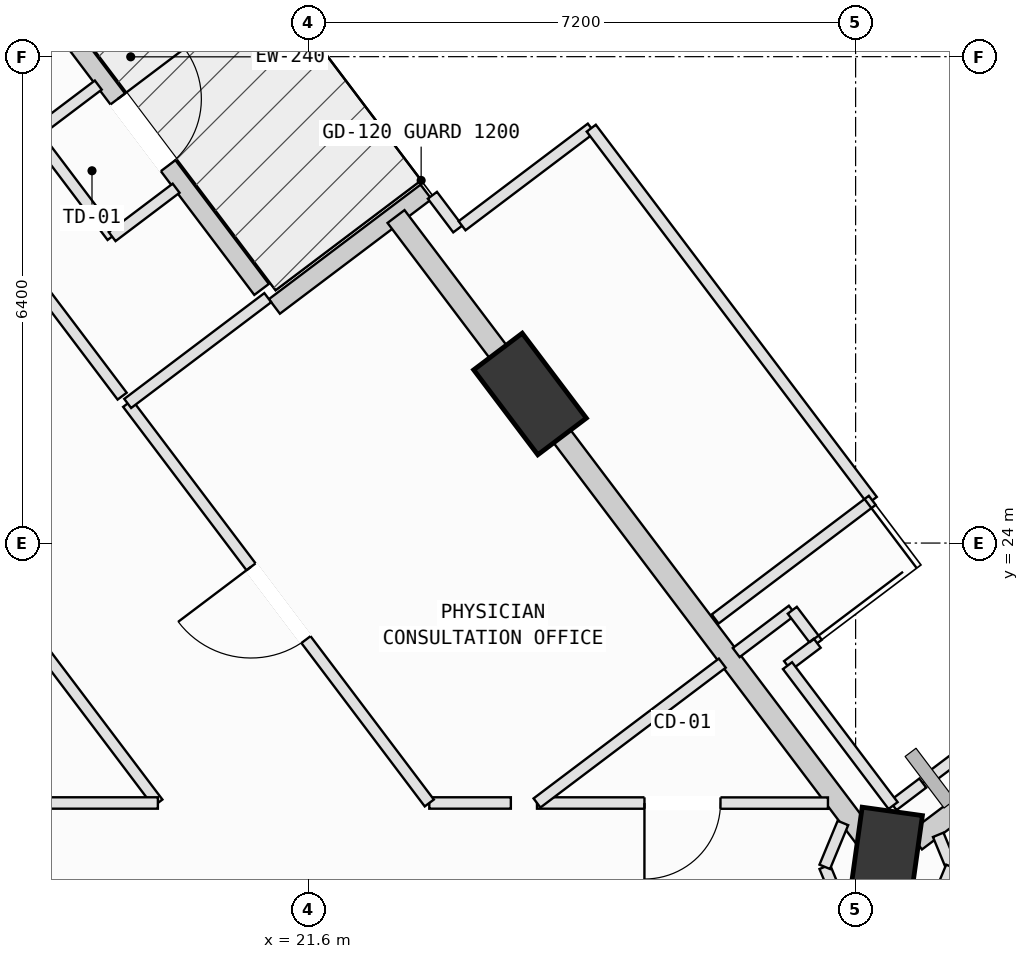
"""IFC4 building model, lengths in metres.
Left out: names, types, materials, properties, quantities, classifications, styles, units other than length and angle.
Written with IfcOpenShell. Run it as: python <this file> out.ifc"""

import sys

from ifc_helpers import new_model, si_unit, direction, frame, frame_2d, origin, origin_2d, place, context, subcontext, project, spatial, rectangle, extrude, element, fill, save


model = new_model("IFC4")
c1 = context("Model", 3, precision=1e-05, world=origin(), true_north=direction((0.0, 1.0)))
c2 = subcontext(c1, "Body", "Model", "MODEL_VIEW")
j1 = project(units=[si_unit("LENGTHUNIT", "METRE"), si_unit("PLANEANGLEUNIT", "RADIAN")], contexts=[c1])
p1 = place(None, origin())
s1 = spatial("IfcSite", under=j1, at=p1, CompositionType="ELEMENT")
p2 = place(p1, origin())
s2 = spatial("IfcBuilding", under=s1, at=p2, CompositionType="ELEMENT")
p3 = place(p2, frame((0.0, 0.0, 181.8)))
s3 = spatial("IfcBuildingStorey", under=s2, at=p3, CompositionType="ELEMENT", Elevation=181.8)
p4 = place(p3, frame((29.186, 19.776, 0.002), z_axis=(0.020946197976, -0.018137086877, 0.999616077737), x_axis=(-0.657890555794, 0.752613449927, 0.027441056587)))
e1 = element("IfcColumn", 1, at=p4, inside=s3, PredefinedType="COLUMN", context=c2, shape_type="SweptSolid", body=[
    extrude(rectangle(XDim=1.4, YDim=0.8, at=origin_2d()), origin(), (0.0, 0.0, 1.0), 3.998),
])
p5 = place(p3, frame((24.516, 25.961, 0.002), z_axis=(-0.004517486263, -0.037666067894, 0.999280170747), x_axis=(-0.503252595216, 0.863608778527, 0.030277104545)))
e2 = element("IfcColumn", 2, at=p5, inside=s3, PredefinedType="COLUMN", context=c2, shape_type="SweptSolid", body=[
    extrude(rectangle(XDim=1.4, YDim=0.8, at=origin_2d()), origin(), (0.0, 0.0, 1.0), 3.999),
])
p6 = place(p3, frame((16.791, 32.892, 0.0), z_axis=(0.0, 0.0, 1.0), x_axis=(0.602494608464, -0.798122952165, 0.0)))
e3 = element("IfcWall", 3, at=p6, inside=s3, PredefinedType="SOLIDWALL", context=c2, shape_type="SweptSolid", body=[
    extrude(rectangle(XDim=6.96, YDim=0.24, at=frame_2d((3.48, 0.0))), origin(), (0.0, 0.0, 1.0), 3.265),
])
p7 = place(p6, frame((3.82, 0.0, 0.0)))
e4 = element("IfcOpeningElement", 4, at=p7, cuts=e3, PredefinedType="OPENING", context=c2, shape_type="SweptSolid", body=[
    extrude(rectangle(XDim=1.1, YDim=2.15, at=frame_2d((0.55, 1.075))), frame((0.0, 0.13, 0.0), z_axis=(0.0, -1.0, 0.0), x_axis=(1.0, 0.0, 0.0)), (0.0, 0.0, 1.0), 0.26),
])
p8 = place(p3, frame((21.153, 27.114, 0.0), z_axis=(0.0, 0.0, 1.0), x_axis=(0.798073955491, 0.602559508735, 0.0)))
e5 = element("IfcWall", 5, at=p8, inside=s3, PredefinedType="SOLIDWALL", context=c2, shape_type="SweptSolid", body=[
    extrude(rectangle(XDim=2.5, YDim=0.24, at=frame_2d((1.25, 0.0))), origin(), (0.0, 0.0, 1.0), 3.265),
])
p9 = place(p3, frame((29.589, 20.08, 0.0), z_axis=(0.0, 0.0, 1.0), x_axis=(0.798108500782, 0.602513751694, 0.0)))
e6 = element("IfcWall", 6, at=p9, inside=s3, PredefinedType="SOLIDWALL", context=c2, shape_type="SweptSolid", body=[
    extrude(rectangle(XDim=5.96, YDim=0.28, at=frame_2d((2.98, 0.0))), origin(), (0.0, 0.0, 1.0), 3.265),
])
p10 = place(p3, frame((28.919, 20.129, 0.0), z_axis=(0.0, 0.0, 1.0), x_axis=(-0.602505021185, 0.798115091604, 0.0)))
e7 = element("IfcWall", 7, at=p10, inside=s3, PredefinedType="SOLIDWALL", context=c2, shape_type="SweptSolid", body=[
    extrude(rectangle(XDim=6.76, YDim=0.28, at=frame_2d((3.38, 0.0))), origin(), (0.0, 0.0, 1.0), 3.265),
])
p11 = place(p3, frame((24.252, 26.312, 0.0), z_axis=(0.0, 0.0, 1.0), x_axis=(-0.602494218239, 0.798123246741, 0.0)))
e8 = element("IfcWall", 8, at=p11, inside=s3, PredefinedType="SOLIDWALL", context=c2, shape_type="SweptSolid", body=[
    extrude(rectangle(XDim=2.487, YDim=0.28, at=frame_2d((1.244, 0.0))), origin(), (0.0, 0.0, 1.0), 3.245),
])
p12 = place(p3, frame((17.183, 23.808, 0.0), z_axis=(0.0, 0.0, 1.0), x_axis=(0.602527348014, -0.798098236369, 0.0)))
e9 = element("IfcWall", 9, at=p12, inside=s3, PredefinedType="PARTITIONING", context=c2, shape_type="SweptSolid", body=[
    extrude(rectangle(XDim=4.045, YDim=0.15, at=frame_2d((2.022, 0.0))), origin(), (0.0, 0.0, 1.0), 3.78),
])
p13 = place(p3, frame((19.62, 20.58, 0.0), z_axis=(0.0, 0.0, 1.0), x_axis=(-1.0, 0.0, 0.0)))
e10 = element("IfcWall", 10, at=p13, inside=s3, PredefinedType="PARTITIONING", context=c2, shape_type="SweptSolid", body=[
    extrude(rectangle(XDim=4.623, YDim=0.15, at=frame_2d((2.312, 0.0))), origin(), (0.0, 0.0, 1.0), 3.78),
])
p14 = place(p13, frame((1.711, 0.0, 0.0)))
e11 = element("IfcOpeningElement", 11, at=p14, cuts=e10, PredefinedType="OPENING", context=c2, shape_type="SweptSolid", body=[
    extrude(rectangle(XDim=1.2, YDim=2.15, at=frame_2d((0.6, 1.075))), frame((0.0, 0.085, 0.0), z_axis=(0.0, -1.0, 0.0), x_axis=(1.0, 0.0, 0.0)), (0.0, 0.0, 1.0), 0.17),
])
p15 = place(p3, frame((29.293, 20.546, 0.0), z_axis=(0.0, 0.0, 1.0), x_axis=(0.797244555245, 0.603656457873, 0.0)))
e12 = element("IfcWall", 12, at=p15, inside=s3, PredefinedType="PARTITIONING", context=c2, shape_type="SweptSolid", body=[
    extrude(rectangle(XDim=0.49, YDim=0.15, at=frame_2d((0.245, 0.0))), origin(), (0.0, 0.0, 1.0), 3.78),
])
p16 = place(p3, frame((29.887, 20.161, 0.0), z_axis=(0.0, 0.0, 1.0), x_axis=(0.382178193532, -0.924088647473, 0.0)))
e13 = element("IfcWall", 13, at=p16, inside=s3, PredefinedType="PARTITIONING", context=c2, shape_type="SweptSolid", body=[
    extrude(rectangle(XDim=0.456, YDim=0.15, at=frame_2d((0.228, 0.0))), origin(), (0.0, 0.0, 1.0), 3.78),
])
p17 = place(p3, frame((30.061, 19.74, 0.0), z_axis=(0.0, 0.0, 1.0), x_axis=(-0.382306769343, -0.924035461503, 0.0)))
e14 = element("IfcWall", 14, at=p17, inside=s3, PredefinedType="PARTITIONING", context=c2, shape_type="SweptSolid", body=[
    extrude(rectangle(XDim=0.639, YDim=0.15, at=frame_2d((0.319, 0.0))), origin(), (0.0, 0.0, 1.0), 3.78),
])
p18 = place(p3, frame((28.638, 19.15, 0.0), z_axis=(0.0, 0.0, 1.0), x_axis=(-0.381980268386, 0.924170479167, 0.0)))
e15 = element("IfcWall", 15, at=p18, inside=s3, PredefinedType="PARTITIONING", context=c2, shape_type="SweptSolid", body=[
    extrude(rectangle(XDim=0.638, YDim=0.15, at=frame_2d((0.319, 0.0))), origin(), (0.0, 0.0, 1.0), 3.78),
])
p19 = place(p3, frame((28.394, 19.74, 0.0), z_axis=(0.0, 0.0, 1.0), x_axis=(0.382754628836, 0.923850038753, 0.0)))
e16 = element("IfcWall", 16, at=p19, inside=s3, PredefinedType="PARTITIONING", context=c2, shape_type="SweptSolid", body=[
    extrude(rectangle(XDim=0.625, YDim=0.15, at=frame_2d((0.312, 0.0))), origin(), (0.0, 0.0, 1.0), 3.78),
])
p20 = place(p3, frame((28.436, 20.578, 0.0), z_axis=(0.0, 0.0, 1.0), x_axis=(-0.999999835274, 0.000573979497, 0.0)))
e17 = element("IfcWall", 17, at=p20, inside=s3, PredefinedType="PARTITIONING", context=c2, shape_type="SweptSolid", body=[
    extrude(rectangle(XDim=3.828, YDim=0.15, at=frame_2d((1.914, 0.0))), origin(), (0.0, 0.0, 1.0), 3.78),
])
p21 = place(p20, frame((1.414, 0.0, 0.0)))
e18 = element("IfcOpeningElement", 18, at=p21, cuts=e17, PredefinedType="OPENING", context=c2, shape_type="SweptSolid", body=[
    extrude(rectangle(XDim=1.0, YDim=2.12, at=frame_2d((0.5, 1.06))), frame((0.0, 0.085, 0.0), z_axis=(0.0, -1.0, 0.0), x_axis=(1.0, 0.0, 0.0)), (0.0, 0.0, 1.0), 0.17),
])
p22 = place(p3, frame((24.608, 20.58, 0.0), z_axis=(0.0, 0.0, 1.0), x_axis=(0.798212355552, 0.602376157765, 0.0)))
e19 = element("IfcWall", 19, at=p22, inside=s3, PredefinedType="PARTITIONING", context=c2, shape_type="SweptSolid", body=[
    extrude(rectangle(XDim=3.054, YDim=0.15, at=frame_2d((1.527, 0.0))), origin(), (0.0, 0.0, 1.0), 3.78),
])
p23 = place(p3, frame((27.229, 22.559, 0.0), z_axis=(0.0, 0.0, 1.0), x_axis=(0.798253828191, 0.602321198182, 0.0)))
e20 = element("IfcWall", 20, at=p23, inside=s3, PredefinedType="PARTITIONING", context=c2, shape_type="SweptSolid", body=[
    extrude(rectangle(XDim=0.925, YDim=0.15, at=frame_2d((0.462, 0.0))), origin(), (0.0, 0.0, 1.0), 3.78),
])
p24 = place(p3, frame((27.967, 23.116, 0.0), z_axis=(0.0, 0.0, 1.0), x_axis=(0.602725153945, -0.797948863525, 0.0)))
e21 = element("IfcWall", 21, at=p24, inside=s3, PredefinedType="PARTITIONING", context=c2, shape_type="SweptSolid", body=[
    extrude(rectangle(XDim=0.544, YDim=0.15, at=frame_2d((0.272, 0.0))), origin(), (0.0, 0.0, 1.0), 3.78),
])
p25 = place(p3, frame((28.295, 22.682, 0.0), z_axis=(0.0, 0.0, 1.0), x_axis=(-0.798261520433, -0.602311003549, 0.0)))
e22 = element("IfcWall", 22, at=p25, inside=s3, PredefinedType="PARTITIONING", context=c2, shape_type="SweptSolid", body=[
    extrude(rectangle(XDim=0.49, YDim=0.15, at=frame_2d((0.245, 0.0))), origin(), (0.0, 0.0, 1.0), 3.78),
])
p26 = place(p3, frame((27.904, 22.387, 0.0), z_axis=(0.0, 0.0, 1.0), x_axis=(0.602250369938, -0.798307266602, 0.0)))
e23 = element("IfcWall", 23, at=p26, inside=s3, PredefinedType="PARTITIONING", context=c2, shape_type="SweptSolid", body=[
    extrude(rectangle(XDim=2.306, YDim=0.15, at=frame_2d((1.153, 0.0))), origin(), (0.0, 0.0, 1.0), 3.78),
])
p27 = place(p3, frame((29.78, 20.914, 0.0), z_axis=(0.0, 0.0, 1.0), x_axis=(0.798108322746, 0.602513987525, 0.0)))
e24 = element("IfcWall", 24, at=p27, inside=s3, PredefinedType="PARTITIONING", context=c2, shape_type="SweptSolid", body=[
    extrude(rectangle(XDim=5.618, YDim=0.15, at=frame_2d((2.809, 0.0))), origin(), (0.0, 0.0, 1.0), 3.78),
])
p28 = place(p3, frame((24.264, 20.58, 0.0), z_axis=(0.0, 0.0, 1.0), x_axis=(-1.0, 0.0, 0.0)))
e25 = element("IfcWall", 25, at=p28, inside=s3, PredefinedType="PARTITIONING", context=c2, shape_type="SweptSolid", body=[
    extrude(rectangle(XDim=1.073, YDim=0.15, at=frame_2d((0.537, 0.0))), origin(), (0.0, 0.0, 1.0), 3.78),
])
p29 = place(p3, frame((23.191, 20.58, 0.0), z_axis=(0.0, 0.0, 1.0), x_axis=(-0.602464385219, 0.798145766476, 0.0)))
e26 = element("IfcWall", 26, at=p29, inside=s3, PredefinedType="PARTITIONING", context=c2, shape_type="SweptSolid", body=[
    extrude(rectangle(XDim=6.586, YDim=0.15, at=frame_2d((3.293, 0.0))), origin(), (0.0, 0.0, 1.0), 3.78),
])
p30 = place(p29, frame((2.693, 0.0, 0.0)))
e27 = element("IfcOpeningElement", 27, at=p30, cuts=e26, PredefinedType="OPENING", context=c2, shape_type="SweptSolid", body=[
    extrude(rectangle(XDim=1.2, YDim=2.15, at=frame_2d((0.6, 1.075))), frame((0.0, 0.085, 0.0), z_axis=(0.0, -1.0, 0.0), x_axis=(1.0, 0.0, 0.0)), (0.0, 0.0, 1.0), 0.17),
])
p31 = place(p3, frame((19.223, 25.837, 0.0), z_axis=(0.0, 0.0, 1.0), x_axis=(0.797953180957, 0.602719438047, 0.0)))
e28 = element("IfcWall", 28, at=p31, inside=s3, PredefinedType="PARTITIONING", context=c2, shape_type="SweptSolid", body=[
    extrude(rectangle(XDim=2.31, YDim=0.15, at=frame_2d((1.155, 0.0))), origin(), (0.0, 0.0, 1.0), 3.78),
])
p32 = place(p3, frame((23.232, 28.576, 0.0), z_axis=(0.0, 0.0, 1.0), x_axis=(0.602110576482, -0.798412708872, 0.0)))
e29 = element("IfcWall", 29, at=p32, inside=s3, PredefinedType="PARTITIONING", context=c2, shape_type="SweptSolid", body=[
    extrude(rectangle(XDim=0.555, YDim=0.15, at=frame_2d((0.277, 0.0))), origin(), (0.0, 0.0, 1.0), 3.78),
])
p33 = place(p3, frame((18.836, 30.026, 0.0), z_axis=(0.0, 0.0, 1.0), x_axis=(-0.797968701854, -0.602698889049, 0.0)))
e30 = element("IfcWall", 30, at=p33, inside=s3, PredefinedType="PARTITIONING", context=c2, shape_type="SweptSolid", body=[
    extrude(rectangle(XDim=1.055, YDim=0.15, at=frame_2d((0.528, 0.0))), origin(), (0.0, 0.0, 1.0), 3.78),
])
p34 = place(p3, frame((17.994, 29.39, 0.0), z_axis=(0.0, 0.0, 1.0), x_axis=(0.602432799865, -0.798169607068, 0.0)))
e31 = element("IfcWall", 31, at=p34, inside=s3, PredefinedType="PARTITIONING", context=c2, shape_type="SweptSolid", body=[
    extrude(rectangle(XDim=1.7, YDim=0.15, at=frame_2d((0.85, 0.0))), origin(), (0.0, 0.0, 1.0), 3.78),
])
p35 = place(p3, frame((19.018, 28.033, 0.0), z_axis=(0.0, 0.0, 1.0), x_axis=(0.797968701854, 0.602698889049, 0.0)))
e32 = element("IfcWall", 32, at=p35, inside=s3, PredefinedType="PARTITIONING", context=c2, shape_type="SweptSolid", body=[
    extrude(rectangle(XDim=1.055, YDim=0.15, at=frame_2d((0.528, 0.0))), origin(), (0.0, 0.0, 1.0), 3.78),
])
p36 = place(p3, frame((19.15, 25.933, 0.0), z_axis=(0.0, 0.0, 1.0), x_axis=(-0.602532763548, 0.798094147862, 0.0)))
e33 = element("IfcWall", 33, at=p36, inside=s3, PredefinedType="PARTITIONING", context=c2, shape_type="SweptSolid", body=[
    extrude(rectangle(XDim=5.13, YDim=0.15, at=frame_2d((2.565, 0.0))), origin(), (0.0, 0.0, 1.0), 3.78),
])
p37 = place(p36, frame((2.105, 0.0, 0.0)))
e34 = element("IfcOpeningElement", 34, at=p37, cuts=e33, PredefinedType="OPENING", context=c2, shape_type="SweptSolid", body=[
    extrude(rectangle(XDim=0.92, YDim=2.1, at=frame_2d((0.46, 1.05))), frame((0.0, 0.085, 0.0), z_axis=(0.0, -1.0, 0.0), x_axis=(1.0, 0.0, 0.0)), (0.0, 0.0, 1.0), 0.17),
])
p38 = place(p3, frame((23.622, 28.175, 0.0), z_axis=(0.0, 0.0, 1.0), x_axis=(0.797973879447, 0.602692033895, 0.0)))
e35 = element("IfcWall", 35, at=p38, inside=s3, PredefinedType="PARTITIONING", context=c2, shape_type="SweptSolid", body=[
    extrude(rectangle(XDim=2.13, YDim=0.15, at=frame_2d((1.065, 0.0))), origin(), (0.0, 0.0, 1.0), 3.78),
])
p39 = place(p3, frame((25.322, 29.459, 0.0), z_axis=(0.0, 0.0, 1.0), x_axis=(0.602530779128, -0.798095646025, 0.0)))
e36 = element("IfcWall", 36, at=p39, inside=s3, PredefinedType="PARTITIONING", context=c2, shape_type="SweptSolid", body=[
    extrude(rectangle(XDim=6.136, YDim=0.15, at=frame_2d((3.068, 0.0))), origin(), (0.0, 0.0, 1.0), 3.78),
])
p40 = place(p3, frame((29.019, 24.562, 0.0), z_axis=(0.0, 0.0, 1.0), x_axis=(-0.798016393194, -0.602635740886, 0.0)))
e37 = element("IfcWall", 37, at=p40, inside=s3, PredefinedType="PARTITIONING", context=c2, shape_type="SweptSolid", body=[
    extrude(rectangle(XDim=2.59, YDim=0.15, at=frame_2d((1.295, 0.0))), origin(), (0.0, 0.0, 1.0), 3.78),
])
p41 = place(p7, origin())
e38 = element("IfcDoor", 38, at=p41, inside=s3, OperationType="SINGLE_SWING_LEFT", PredefinedType="DOOR", context=c2, shape_type="SweptSolid", body=[
    extrude(rectangle(XDim=1.1, YDim=2.15, at=frame_2d((0.55, 1.075))), frame((0.0, 0.025, 0.0), z_axis=(0.0, -1.0, 0.0), x_axis=(1.0, 0.0, 0.0)), (0.0, 0.0, 1.0), 0.05),
])
fill(e4, e38)
p42 = place(p21, origin())
e39 = element("IfcDoor", 39, at=p42, inside=s3, OperationType="SINGLE_SWING_RIGHT", PredefinedType="DOOR", context=c2, shape_type="SweptSolid", body=[
    extrude(rectangle(XDim=1.0, YDim=2.12, at=frame_2d((0.5, 1.06))), frame((0.0, 0.025, 0.0), z_axis=(0.0, -1.0, 0.0), x_axis=(1.0, 0.0, 0.0)), (0.0, 0.0, 1.0), 0.05),
])
fill(e18, e39)
p43 = place(p30, origin())
e40 = element("IfcDoor", 40, at=p43, inside=s3, OperationType="SINGLE_SWING_RIGHT", PredefinedType="DOOR", context=c2, shape_type="SweptSolid", body=[
    extrude(rectangle(XDim=1.2, YDim=2.15, at=frame_2d((0.6, 1.075))), frame((0.0, 0.025, 0.0), z_axis=(0.0, -1.0, 0.0), x_axis=(1.0, 0.0, 0.0)), (0.0, 0.0, 1.0), 0.05),
])
fill(e27, e40)
save(model, sys.argv[1])
